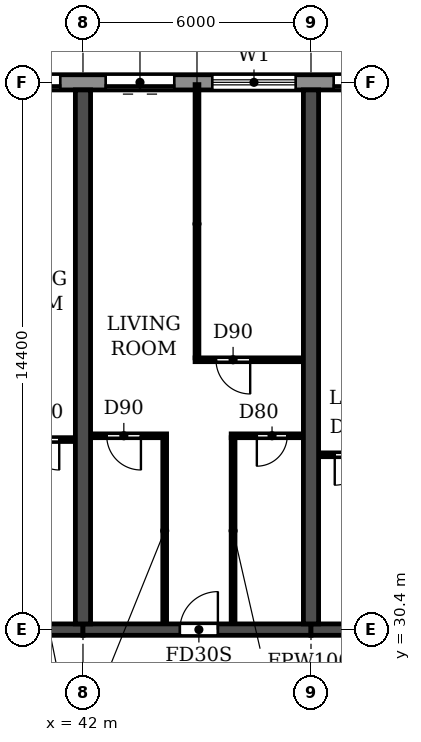
"""IFC4 building model, lengths in metres.
Left out: names, types, materials, properties, quantities, classifications, styles, units other than length and angle.
Written with IfcOpenShell. Run it as: python <this file> out.ifc"""

import sys

from ifc_helpers import new_model, si_unit, direction, frame, frame_2d, origin, place, context, subcontext, project, spatial, rectangle, extrude, element, fill, save


model = new_model("IFC4")
c1 = context("Model", 3, precision=1e-05, world=origin(), true_north=direction((0.0, 1.0)))
c2 = subcontext(c1, "Body", "Model", "MODEL_VIEW")
j1 = project(units=[si_unit("LENGTHUNIT", "METRE"), si_unit("PLANEANGLEUNIT", "RADIAN")], contexts=[c1])
p1 = place(None, origin())
s1 = spatial("IfcSite", under=j1, at=p1, CompositionType="ELEMENT")
p2 = place(p1, origin())
s2 = spatial("IfcBuilding", under=s1, at=p2, CompositionType="ELEMENT")
p3 = place(p2, frame((0.0, 0.0, 23.4)))
s3 = spatial("IfcBuildingStorey", under=s2, at=p3, CompositionType="ELEMENT", Elevation=23.4)
for number, where, z_axis, x_axis in (
    (1, (42.0, 30.55, 0.0), (0.0, 0.0, 1.0), (0.0, 1.0, 0.0)),
    (2, (48.0, 30.55, 0.0), (0.0, 0.0, 1.0), (0.0, 1.0, 0.0)),
):
    element("IfcWall", number, at=place(p3, frame(where, z_axis=z_axis, x_axis=x_axis)), inside=s3, PredefinedType="SHEAR", context=c2, shape_type="SweptSolid", body=[
        extrude(rectangle(XDim=14.05, YDim=0.4, at=frame_2d((7.025, 0.0))), origin(), (0.0, 0.0, 1.0), 3.05),
    ])
p4 = place(p3, frame((36.0, 30.4, 0.0), z_axis=(0.0, 0.0, 1.0), x_axis=(1.0, 0.0, 0.0)))
e3 = element("IfcWall", 3, at=p4, inside=s3, PredefinedType="SHEAR", context=c2, shape_type="SweptSolid", body=[
    extrude(rectangle(XDim=6.0, YDim=0.3, at=frame_2d((3.0, 0.0))), origin(), (0.0, 0.0, 1.0), 2.45),
])
p5 = place(p4, frame((2.55, 0.0, 0.0)))
e4 = element("IfcOpeningElement", 4, at=p5, cuts=e3, PredefinedType="OPENING", context=c2, shape_type="SweptSolid", body=[
    extrude(rectangle(XDim=1.0, YDim=2.1, at=frame_2d((0.5, 1.05))), frame((0.0, 0.16, 0.0), z_axis=(0.0, -1.0, 0.0), x_axis=(1.0, 0.0, 0.0)), (0.0, 0.0, 1.0), 0.32),
])
p6 = place(p3, frame((42.0, 30.4, 0.0), z_axis=(0.0, 0.0, 1.0), x_axis=(1.0, 0.0, 0.0)))
e5 = element("IfcWall", 5, at=p6, inside=s3, PredefinedType="SHEAR", context=c2, shape_type="SweptSolid", body=[
    extrude(rectangle(XDim=6.0, YDim=0.3, at=frame_2d((3.0, 0.0))), origin(), (0.0, 0.0, 1.0), 2.45),
])
p7 = place(p6, frame((2.55, 0.0, 0.0)))
e6 = element("IfcOpeningElement", 6, at=p7, cuts=e5, PredefinedType="OPENING", context=c2, shape_type="SweptSolid", body=[
    extrude(rectangle(XDim=1.0, YDim=2.1, at=frame_2d((0.5, 1.05))), frame((0.0, 0.16, 0.0), z_axis=(0.0, -1.0, 0.0), x_axis=(1.0, 0.0, 0.0)), (0.0, 0.0, 1.0), 0.32),
])
p8 = place(p3, frame((48.0, 30.4, 0.0), z_axis=(0.0, 0.0, 1.0), x_axis=(1.0, 0.0, 0.0)))
e7 = element("IfcWall", 7, at=p8, inside=s3, PredefinedType="SHEAR", context=c2, shape_type="SweptSolid", body=[
    extrude(rectangle(XDim=6.0, YDim=0.3, at=frame_2d((3.0, 0.0))), origin(), (0.0, 0.0, 1.0), 2.45),
])
p9 = place(p8, frame((2.45, 0.0, 0.0)))
e8 = element("IfcOpeningElement", 8, at=p9, cuts=e7, PredefinedType="OPENING", context=c2, shape_type="SweptSolid", body=[
    extrude(rectangle(XDim=1.0, YDim=2.1, at=frame_2d((0.5, 1.05))), frame((0.0, 0.16, 0.0), z_axis=(0.0, -1.0, 0.0), x_axis=(1.0, 0.0, 0.0)), (0.0, 0.0, 1.0), 0.32),
])
p10 = place(p3, frame((97.317, 44.8, 0.0), z_axis=(0.0, 0.0, 1.0), x_axis=(-1.0, 0.0, 0.0)))
e9 = element("IfcWall", 9, at=p10, inside=s3, PredefinedType="STANDARD", context=c2, shape_type="SweptSolid", body=[
    extrude(rectangle(XDim=92.634, YDim=0.4, at=frame_2d((46.317, 0.0))), origin(), (0.0, 0.0, 1.0), 3.05),
])
p11 = place(p10, frame((88.717, 0.0, 0.9)))
e10 = element("IfcOpeningElement", 10, at=p11, cuts=e9, PredefinedType="OPENING", context=c2, shape_type="SweptSolid", body=[
    extrude(rectangle(XDim=2.2, YDim=1.5, at=frame_2d((1.1, 0.75))), frame((0.0, 0.21, 0.0), z_axis=(0.0, -1.0, 0.0), x_axis=(1.0, 0.0, 0.0)), (0.0, 0.0, 1.0), 0.42),
])
p12 = place(p10, frame((85.917, 0.0, 0.0)))
e11 = element("IfcOpeningElement", 11, at=p12, cuts=e9, PredefinedType="OPENING", context=c2, shape_type="SweptSolid", body=[
    extrude(rectangle(XDim=1.8, YDim=2.4, at=frame_2d((0.9, 1.2))), frame((0.0, 0.21, 0.0), z_axis=(0.0, -1.0, 0.0), x_axis=(1.0, 0.0, 0.0)), (0.0, 0.0, 1.0), 0.42),
])
p13 = place(p10, frame((82.717, 0.0, 0.9)))
e12 = element("IfcOpeningElement", 12, at=p13, cuts=e9, PredefinedType="OPENING", context=c2, shape_type="SweptSolid", body=[
    extrude(rectangle(XDim=2.2, YDim=1.5, at=frame_2d((1.1, 0.75))), frame((0.0, 0.21, 0.0), z_axis=(0.0, -1.0, 0.0), x_axis=(1.0, 0.0, 0.0)), (0.0, 0.0, 1.0), 0.42),
])
p14 = place(p10, frame((79.717, 0.0, 0.9)))
e13 = element("IfcOpeningElement", 13, at=p14, cuts=e9, PredefinedType="OPENING", context=c2, shape_type="SweptSolid", body=[
    extrude(rectangle(XDim=2.2, YDim=1.5, at=frame_2d((1.1, 0.75))), frame((0.0, 0.21, 0.0), z_axis=(0.0, -1.0, 0.0), x_axis=(1.0, 0.0, 0.0)), (0.0, 0.0, 1.0), 0.42),
])
p15 = place(p10, frame((76.917, 0.0, 0.0)))
e14 = element("IfcOpeningElement", 14, at=p15, cuts=e9, PredefinedType="OPENING", context=c2, shape_type="SweptSolid", body=[
    extrude(rectangle(XDim=1.8, YDim=2.4, at=frame_2d((0.9, 1.2))), frame((0.0, 0.21, 0.0), z_axis=(0.0, -1.0, 0.0), x_axis=(1.0, 0.0, 0.0)), (0.0, 0.0, 1.0), 0.42),
])
p16 = place(p10, frame((73.717, 0.0, 0.9)))
e15 = element("IfcOpeningElement", 15, at=p16, cuts=e9, PredefinedType="OPENING", context=c2, shape_type="SweptSolid", body=[
    extrude(rectangle(XDim=2.2, YDim=1.5, at=frame_2d((1.1, 0.75))), frame((0.0, 0.21, 0.0), z_axis=(0.0, -1.0, 0.0), x_axis=(1.0, 0.0, 0.0)), (0.0, 0.0, 1.0), 0.42),
])
p17 = place(p10, frame((70.717, 0.0, 0.9)))
e16 = element("IfcOpeningElement", 16, at=p17, cuts=e9, PredefinedType="OPENING", context=c2, shape_type="SweptSolid", body=[
    extrude(rectangle(XDim=2.2, YDim=1.5, at=frame_2d((1.1, 0.75))), frame((0.0, 0.21, 0.0), z_axis=(0.0, -1.0, 0.0), x_axis=(1.0, 0.0, 0.0)), (0.0, 0.0, 1.0), 0.42),
])
p18 = place(p10, frame((67.717, 0.0, 0.9)))
e17 = element("IfcOpeningElement", 17, at=p18, cuts=e9, PredefinedType="OPENING", context=c2, shape_type="SweptSolid", body=[
    extrude(rectangle(XDim=2.2, YDim=1.5, at=frame_2d((1.1, 0.75))), frame((0.0, 0.21, 0.0), z_axis=(0.0, -1.0, 0.0), x_axis=(1.0, 0.0, 0.0)), (0.0, 0.0, 1.0), 0.42),
])
p19 = place(p10, frame((64.917, 0.0, 0.0)))
e18 = element("IfcOpeningElement", 18, at=p19, cuts=e9, PredefinedType="OPENING", context=c2, shape_type="SweptSolid", body=[
    extrude(rectangle(XDim=1.8, YDim=2.4, at=frame_2d((0.9, 1.2))), frame((0.0, 0.21, 0.0), z_axis=(0.0, -1.0, 0.0), x_axis=(1.0, 0.0, 0.0)), (0.0, 0.0, 1.0), 0.42),
])
p20 = place(p10, frame((61.717, 0.0, 0.9)))
e19 = element("IfcOpeningElement", 19, at=p20, cuts=e9, PredefinedType="OPENING", context=c2, shape_type="SweptSolid", body=[
    extrude(rectangle(XDim=2.2, YDim=1.5, at=frame_2d((1.1, 0.75))), frame((0.0, 0.21, 0.0), z_axis=(0.0, -1.0, 0.0), x_axis=(1.0, 0.0, 0.0)), (0.0, 0.0, 1.0), 0.42),
])
p21 = place(p10, frame((58.717, 0.0, 0.9)))
e20 = element("IfcOpeningElement", 20, at=p21, cuts=e9, PredefinedType="OPENING", context=c2, shape_type="SweptSolid", body=[
    extrude(rectangle(XDim=2.2, YDim=1.5, at=frame_2d((1.1, 0.75))), frame((0.0, 0.21, 0.0), z_axis=(0.0, -1.0, 0.0), x_axis=(1.0, 0.0, 0.0)), (0.0, 0.0, 1.0), 0.42),
])
p22 = place(p10, frame((55.917, 0.0, 0.0)))
e21 = element("IfcOpeningElement", 21, at=p22, cuts=e9, PredefinedType="OPENING", context=c2, shape_type="SweptSolid", body=[
    extrude(rectangle(XDim=1.8, YDim=2.4, at=frame_2d((0.9, 1.2))), frame((0.0, 0.21, 0.0), z_axis=(0.0, -1.0, 0.0), x_axis=(1.0, 0.0, 0.0)), (0.0, 0.0, 1.0), 0.42),
])
p23 = place(p10, frame((52.917, 0.0, 0.0)))
e22 = element("IfcOpeningElement", 22, at=p23, cuts=e9, PredefinedType="OPENING", context=c2, shape_type="SweptSolid", body=[
    extrude(rectangle(XDim=1.8, YDim=2.4, at=frame_2d((0.9, 1.2))), frame((0.0, 0.21, 0.0), z_axis=(0.0, -1.0, 0.0), x_axis=(1.0, 0.0, 0.0)), (0.0, 0.0, 1.0), 0.42),
])
p24 = place(p10, frame((49.717, 0.0, 0.9)))
e23 = element("IfcOpeningElement", 23, at=p24, cuts=e9, PredefinedType="OPENING", context=c2, shape_type="SweptSolid", body=[
    extrude(rectangle(XDim=2.2, YDim=1.5, at=frame_2d((1.1, 0.75))), frame((0.0, 0.21, 0.0), z_axis=(0.0, -1.0, 0.0), x_axis=(1.0, 0.0, 0.0)), (0.0, 0.0, 1.0), 0.42),
])
p25 = place(p10, frame((46.917, 0.0, 0.0)))
e24 = element("IfcOpeningElement", 24, at=p25, cuts=e9, PredefinedType="OPENING", context=c2, shape_type="SweptSolid", body=[
    extrude(rectangle(XDim=1.8, YDim=2.4, at=frame_2d((0.9, 1.2))), frame((0.0, 0.21, 0.0), z_axis=(0.0, -1.0, 0.0), x_axis=(1.0, 0.0, 0.0)), (0.0, 0.0, 1.0), 0.42),
])
p26 = place(p10, frame((43.717, 0.0, 0.9)))
e25 = element("IfcOpeningElement", 25, at=p26, cuts=e9, PredefinedType="OPENING", context=c2, shape_type="SweptSolid", body=[
    extrude(rectangle(XDim=2.2, YDim=1.5, at=frame_2d((1.1, 0.75))), frame((0.0, 0.21, 0.0), z_axis=(0.0, -1.0, 0.0), x_axis=(1.0, 0.0, 0.0)), (0.0, 0.0, 1.0), 0.42),
])
p27 = place(p10, frame((40.717, 0.0, 0.9)))
e26 = element("IfcOpeningElement", 26, at=p27, cuts=e9, PredefinedType="OPENING", context=c2, shape_type="SweptSolid", body=[
    extrude(rectangle(XDim=2.2, YDim=1.5, at=frame_2d((1.1, 0.75))), frame((0.0, 0.21, 0.0), z_axis=(0.0, -1.0, 0.0), x_axis=(1.0, 0.0, 0.0)), (0.0, 0.0, 1.0), 0.42),
])
p28 = place(p10, frame((37.917, 0.0, 0.0)))
e27 = element("IfcOpeningElement", 27, at=p28, cuts=e9, PredefinedType="OPENING", context=c2, shape_type="SweptSolid", body=[
    extrude(rectangle(XDim=1.8, YDim=2.4, at=frame_2d((0.9, 1.2))), frame((0.0, 0.21, 0.0), z_axis=(0.0, -1.0, 0.0), x_axis=(1.0, 0.0, 0.0)), (0.0, 0.0, 1.0), 0.42),
])
p29 = place(p10, frame((34.917, 0.0, 0.0)))
e28 = element("IfcOpeningElement", 28, at=p29, cuts=e9, PredefinedType="OPENING", context=c2, shape_type="SweptSolid", body=[
    extrude(rectangle(XDim=1.8, YDim=2.4, at=frame_2d((0.9, 1.2))), frame((0.0, 0.21, 0.0), z_axis=(0.0, -1.0, 0.0), x_axis=(1.0, 0.0, 0.0)), (0.0, 0.0, 1.0), 0.42),
])
p30 = place(p10, frame((31.717, 0.0, 0.9)))
e29 = element("IfcOpeningElement", 29, at=p30, cuts=e9, PredefinedType="OPENING", context=c2, shape_type="SweptSolid", body=[
    extrude(rectangle(XDim=2.2, YDim=1.5, at=frame_2d((1.1, 0.75))), frame((0.0, 0.21, 0.0), z_axis=(0.0, -1.0, 0.0), x_axis=(1.0, 0.0, 0.0)), (0.0, 0.0, 1.0), 0.42),
])
p31 = place(p10, frame((28.717, 0.0, 0.9)))
e30 = element("IfcOpeningElement", 30, at=p31, cuts=e9, PredefinedType="OPENING", context=c2, shape_type="SweptSolid", body=[
    extrude(rectangle(XDim=2.2, YDim=1.5, at=frame_2d((1.1, 0.75))), frame((0.0, 0.21, 0.0), z_axis=(0.0, -1.0, 0.0), x_axis=(1.0, 0.0, 0.0)), (0.0, 0.0, 1.0), 0.42),
])
p32 = place(p10, frame((25.717, 0.0, 0.9)))
e31 = element("IfcOpeningElement", 31, at=p32, cuts=e9, PredefinedType="OPENING", context=c2, shape_type="SweptSolid", body=[
    extrude(rectangle(XDim=2.2, YDim=1.5, at=frame_2d((1.1, 0.75))), frame((0.0, 0.21, 0.0), z_axis=(0.0, -1.0, 0.0), x_axis=(1.0, 0.0, 0.0)), (0.0, 0.0, 1.0), 0.42),
])
p33 = place(p10, frame((22.717, 0.0, 0.9)))
e32 = element("IfcOpeningElement", 32, at=p33, cuts=e9, PredefinedType="OPENING", context=c2, shape_type="SweptSolid", body=[
    extrude(rectangle(XDim=2.2, YDim=1.5, at=frame_2d((1.1, 0.75))), frame((0.0, 0.21, 0.0), z_axis=(0.0, -1.0, 0.0), x_axis=(1.0, 0.0, 0.0)), (0.0, 0.0, 1.0), 0.42),
])
p34 = place(p10, frame((19.917, 0.0, 0.0)))
e33 = element("IfcOpeningElement", 33, at=p34, cuts=e9, PredefinedType="OPENING", context=c2, shape_type="SweptSolid", body=[
    extrude(rectangle(XDim=1.8, YDim=2.4, at=frame_2d((0.9, 1.2))), frame((0.0, 0.21, 0.0), z_axis=(0.0, -1.0, 0.0), x_axis=(1.0, 0.0, 0.0)), (0.0, 0.0, 1.0), 0.42),
])
p35 = place(p10, frame((16.717, 0.0, 0.9)))
e34 = element("IfcOpeningElement", 34, at=p35, cuts=e9, PredefinedType="OPENING", context=c2, shape_type="SweptSolid", body=[
    extrude(rectangle(XDim=2.2, YDim=1.5, at=frame_2d((1.1, 0.75))), frame((0.0, 0.21, 0.0), z_axis=(0.0, -1.0, 0.0), x_axis=(1.0, 0.0, 0.0)), (0.0, 0.0, 1.0), 0.42),
])
p36 = place(p10, frame((13.717, 0.0, 0.9)))
e35 = element("IfcOpeningElement", 35, at=p36, cuts=e9, PredefinedType="OPENING", context=c2, shape_type="SweptSolid", body=[
    extrude(rectangle(XDim=2.2, YDim=1.5, at=frame_2d((1.1, 0.75))), frame((0.0, 0.21, 0.0), z_axis=(0.0, -1.0, 0.0), x_axis=(1.0, 0.0, 0.0)), (0.0, 0.0, 1.0), 0.42),
])
p37 = place(p10, frame((10.717, 0.0, 0.9)))
e36 = element("IfcOpeningElement", 36, at=p37, cuts=e9, PredefinedType="OPENING", context=c2, shape_type="SweptSolid", body=[
    extrude(rectangle(XDim=2.2, YDim=1.5, at=frame_2d((1.1, 0.75))), frame((0.0, 0.21, 0.0), z_axis=(0.0, -1.0, 0.0), x_axis=(1.0, 0.0, 0.0)), (0.0, 0.0, 1.0), 0.42),
])
p38 = place(p10, frame((7.917, 0.0, 0.0)))
e37 = element("IfcOpeningElement", 37, at=p38, cuts=e9, PredefinedType="OPENING", context=c2, shape_type="SweptSolid", body=[
    extrude(rectangle(XDim=1.8, YDim=2.4, at=frame_2d((0.9, 1.2))), frame((0.0, 0.21, 0.0), z_axis=(0.0, -1.0, 0.0), x_axis=(1.0, 0.0, 0.0)), (0.0, 0.0, 1.0), 0.42),
])
p39 = place(p10, frame((4.917, 0.0, 0.0)))
e38 = element("IfcOpeningElement", 38, at=p39, cuts=e9, PredefinedType="OPENING", context=c2, shape_type="SweptSolid", body=[
    extrude(rectangle(XDim=1.8, YDim=2.4, at=frame_2d((0.9, 1.2))), frame((0.0, 0.21, 0.0), z_axis=(0.0, -1.0, 0.0), x_axis=(1.0, 0.0, 0.0)), (0.0, 0.0, 1.0), 0.42),
])
p40 = place(p10, frame((1.717, 0.0, 0.9)))
e39 = element("IfcOpeningElement", 39, at=p40, cuts=e9, PredefinedType="OPENING", context=c2, shape_type="SweptSolid", body=[
    extrude(rectangle(XDim=2.2, YDim=1.5, at=frame_2d((1.1, 0.75))), frame((0.0, 0.21, 0.0), z_axis=(0.0, -1.0, 0.0), x_axis=(1.0, 0.0, 0.0)), (0.0, 0.0, 1.0), 0.42),
])
p41 = place(p3, frame((48.21, 35.0, 0.0), z_axis=(0.0, 0.0, 1.0), x_axis=(1.0, 0.0, 0.0)))
e40 = element("IfcWall", 40, at=p41, inside=s3, PredefinedType="PARTITIONING", context=c2, shape_type="SweptSolid", body=[
    extrude(rectangle(XDim=1.89, YDim=0.1, at=frame_2d((0.945, 0.0))), origin(), (0.0, 0.0, 1.0), 3.05),
])
p42 = place(p41, frame((0.415, 0.0, 0.0)))
e41 = element("IfcOpeningElement", 41, at=p42, cuts=e40, PredefinedType="OPENING", context=c2, shape_type="SweptSolid", body=[
    extrude(rectangle(XDim=0.8, YDim=2.1, at=frame_2d((0.4, 1.05))), frame((0.0, 0.06, 0.0), z_axis=(0.0, -1.0, 0.0), x_axis=(1.0, 0.0, 0.0)), (0.0, 0.0, 1.0), 0.12),
])
p43 = place(p3, frame((39.9, 35.4, 0.0), z_axis=(0.0, 0.0, 1.0), x_axis=(1.0, 0.0, 0.0)))
e42 = element("IfcWall", 42, at=p43, inside=s3, PredefinedType="PARTITIONING", context=c2, shape_type="SweptSolid", body=[
    extrude(rectangle(XDim=1.89, YDim=0.1, at=frame_2d((0.945, 0.0))), origin(), (0.0, 0.0, 1.0), 3.05),
])
p44 = place(p43, frame((0.675, 0.0, 0.0)))
e43 = element("IfcOpeningElement", 43, at=p44, cuts=e42, PredefinedType="OPENING", context=c2, shape_type="SweptSolid", body=[
    extrude(rectangle(XDim=0.8, YDim=2.1, at=frame_2d((0.4, 1.05))), frame((0.0, 0.06, 0.0), z_axis=(0.0, -1.0, 0.0), x_axis=(1.0, 0.0, 0.0)), (0.0, 0.0, 1.0), 0.12),
])
p45 = place(p3, frame((42.21, 35.5, 0.0), z_axis=(0.0, 0.0, 1.0), x_axis=(1.0, 0.0, 0.0)))
e44 = element("IfcWall", 44, at=p45, inside=s3, PredefinedType="PARTITIONING", context=c2, shape_type="SweptSolid", body=[
    extrude(rectangle(XDim=1.99, YDim=0.1, at=frame_2d((0.995, 0.0))), origin(), (0.0, 0.0, 1.0), 3.05),
])
p46 = place(p45, frame((0.415, 0.0, 0.0)))
e45 = element("IfcOpeningElement", 45, at=p46, cuts=e44, PredefinedType="OPENING", context=c2, shape_type="SweptSolid", body=[
    extrude(rectangle(XDim=0.9, YDim=2.1, at=frame_2d((0.45, 1.05))), frame((0.0, 0.06, 0.0), z_axis=(0.0, -1.0, 0.0), x_axis=(1.0, 0.0, 0.0)), (0.0, 0.0, 1.0), 0.12),
])
p47 = place(p3, frame((45.9, 35.5, 0.0), z_axis=(0.0, 0.0, 1.0), x_axis=(1.0, 0.0, 0.0)))
e46 = element("IfcWall", 46, at=p47, inside=s3, PredefinedType="PARTITIONING", context=c2, shape_type="SweptSolid", body=[
    extrude(rectangle(XDim=1.89, YDim=0.1, at=frame_2d((0.945, 0.0))), origin(), (0.0, 0.0, 1.0), 3.05),
])
p48 = place(p47, frame((0.675, 0.0, 0.0)))
e47 = element("IfcOpeningElement", 47, at=p48, cuts=e46, PredefinedType="OPENING", context=c2, shape_type="SweptSolid", body=[
    extrude(rectangle(XDim=0.8, YDim=2.1, at=frame_2d((0.4, 1.05))), frame((0.0, 0.06, 0.0), z_axis=(0.0, -1.0, 0.0), x_axis=(1.0, 0.0, 0.0)), (0.0, 0.0, 1.0), 0.12),
])
p49 = place(p3, frame((44.95, 37.5, 0.0), z_axis=(0.0, 0.0, 1.0), x_axis=(1.0, 0.0, 0.0)))
e48 = element("IfcWall", 48, at=p49, inside=s3, PredefinedType="PARTITIONING", context=c2, shape_type="SweptSolid", body=[
    extrude(rectangle(XDim=2.84, YDim=0.1, at=frame_2d((1.42, 0.0))), origin(), (0.0, 0.0, 1.0), 3.05),
])
p50 = place(p49, frame((0.55, 0.0, 0.0)))
e49 = element("IfcOpeningElement", 49, at=p50, cuts=e48, PredefinedType="OPENING", context=c2, shape_type="SweptSolid", body=[
    extrude(rectangle(XDim=0.9, YDim=2.1, at=frame_2d((0.45, 1.05))), frame((0.0, 0.06, 0.0), z_axis=(0.0, -1.0, 0.0), x_axis=(1.0, 0.0, 0.0)), (0.0, 0.0, 1.0), 0.12),
])
p51 = place(p3, frame((44.15, 30.56, 0.0), z_axis=(0.0, 0.0, 1.0), x_axis=(0.0, 1.0, 0.0)))
e50 = element("IfcWall", 50, at=p51, inside=s3, PredefinedType="PARTITIONING", context=c2, shape_type="SweptSolid", body=[
    extrude(rectangle(XDim=4.89, YDim=0.1, at=frame_2d((2.445, 0.0))), origin(), (0.0, 0.0, 1.0), 3.05),
])
p52 = place(p3, frame((45.0, 37.55, 0.0), z_axis=(0.0, 0.0, 1.0), x_axis=(0.0, 1.0, 0.0)))
e51 = element("IfcWall", 51, at=p52, inside=s3, PredefinedType="PARTITIONING", context=c2, shape_type="SweptSolid", body=[
    extrude(rectangle(XDim=7.19, YDim=0.1, at=frame_2d((3.595, 0.0))), origin(), (0.0, 0.0, 1.0), 3.05),
])
p53 = place(p3, frame((45.95, 30.56, 0.0), z_axis=(0.0, 0.0, 1.0), x_axis=(0.0, 1.0, 0.0)))
e52 = element("IfcWall", 52, at=p53, inside=s3, PredefinedType="PARTITIONING", context=c2, shape_type="SweptSolid", body=[
    extrude(rectangle(XDim=4.89, YDim=0.1, at=frame_2d((2.445, 0.0))), origin(), (0.0, 0.0, 1.0), 3.05),
])
p54 = place(p22, origin())
e53 = element("IfcDoor", 53, at=p54, inside=s3, OperationType="DOUBLE_DOOR_SLIDING", PredefinedType="DOOR", context=c2, shape_type="SweptSolid", body=[
    extrude(rectangle(XDim=1.8, YDim=2.4, at=frame_2d((0.9, 1.2))), frame((0.0, 0.025, 0.0), z_axis=(0.0, -1.0, 0.0), x_axis=(1.0, 0.0, 0.0)), (0.0, 0.0, 1.0), 0.05),
])
fill(e21, e53)
p55 = place(p23, origin())
e54 = element("IfcDoor", 54, at=p55, inside=s3, OperationType="DOUBLE_DOOR_SLIDING", PredefinedType="DOOR", context=c2, shape_type="SweptSolid", body=[
    extrude(rectangle(XDim=1.8, YDim=2.4, at=frame_2d((0.9, 1.2))), frame((0.0, 0.025, 0.0), z_axis=(0.0, -1.0, 0.0), x_axis=(1.0, 0.0, 0.0)), (0.0, 0.0, 1.0), 0.05),
])
fill(e22, e54)
p56 = place(p24, origin())
e55 = element("IfcWindow", 55, at=p56, inside=s3, PartitioningType="DOUBLE_PANEL_HORIZONTAL", PredefinedType="WINDOW", context=c2, shape_type="SweptSolid", body=[
    extrude(rectangle(XDim=2.2, YDim=1.5, at=frame_2d((1.1, 0.75))), frame((0.0, 0.03, 0.0), z_axis=(0.0, -1.0, 0.0), x_axis=(1.0, 0.0, 0.0)), (0.0, 0.0, 1.0), 0.06),
])
fill(e23, e55)
p57 = place(p25, origin())
e56 = element("IfcDoor", 56, at=p57, inside=s3, OperationType="DOUBLE_DOOR_SLIDING", PredefinedType="DOOR", context=c2, shape_type="SweptSolid", body=[
    extrude(rectangle(XDim=1.8, YDim=2.4, at=frame_2d((0.9, 1.2))), frame((0.0, 0.025, 0.0), z_axis=(0.0, -1.0, 0.0), x_axis=(1.0, 0.0, 0.0)), (0.0, 0.0, 1.0), 0.05),
])
fill(e24, e56)
p58 = place(p44, frame((0.8, 0.0, 0.0), z_axis=(0.0, 0.0, 1.0), x_axis=(-1.0, 0.0, 0.0)))
e57 = element("IfcDoor", 57, at=p58, inside=s3, OperationType="SINGLE_SWING_LEFT", PredefinedType="DOOR", context=c2, shape_type="SweptSolid", body=[
    extrude(rectangle(XDim=0.8, YDim=2.1, at=frame_2d((0.4, 1.05))), frame((0.0, 0.025, 0.0), z_axis=(0.0, -1.0, 0.0), x_axis=(1.0, 0.0, 0.0)), (0.0, 0.0, 1.0), 0.05),
])
fill(e43, e57)
p59 = place(p46, frame((0.9, 0.0, 0.0), z_axis=(0.0, 0.0, 1.0), x_axis=(-1.0, 0.0, 0.0)))
e58 = element("IfcDoor", 58, at=p59, inside=s3, OperationType="SINGLE_SWING_LEFT", PredefinedType="DOOR", context=c2, shape_type="SweptSolid", body=[
    extrude(rectangle(XDim=0.9, YDim=2.1, at=frame_2d((0.45, 1.05))), frame((0.0, 0.025, 0.0), z_axis=(0.0, -1.0, 0.0), x_axis=(1.0, 0.0, 0.0)), (0.0, 0.0, 1.0), 0.05),
])
fill(e45, e58)
p60 = place(p7, origin())
e59 = element("IfcDoor", 59, at=p60, inside=s3, OperationType="SINGLE_SWING_RIGHT", PredefinedType="DOOR", context=c2, shape_type="SweptSolid", body=[
    extrude(rectangle(XDim=1.0, YDim=2.1, at=frame_2d((0.5, 1.05))), frame((0.0, 0.025, 0.0), z_axis=(0.0, -1.0, 0.0), x_axis=(1.0, 0.0, 0.0)), (0.0, 0.0, 1.0), 0.05),
])
fill(e6, e59)
p61 = place(p50, frame((0.9, 0.0, 0.0), z_axis=(0.0, 0.0, 1.0), x_axis=(-1.0, 0.0, 0.0)))
e60 = element("IfcDoor", 60, at=p61, inside=s3, OperationType="SINGLE_SWING_LEFT", PredefinedType="DOOR", context=c2, shape_type="SweptSolid", body=[
    extrude(rectangle(XDim=0.9, YDim=2.1, at=frame_2d((0.45, 1.05))), frame((0.0, 0.025, 0.0), z_axis=(0.0, -1.0, 0.0), x_axis=(1.0, 0.0, 0.0)), (0.0, 0.0, 1.0), 0.05),
])
fill(e49, e60)
p62 = place(p48, frame((0.8, 0.0, 0.0), z_axis=(0.0, 0.0, 1.0), x_axis=(-1.0, 0.0, 0.0)))
e61 = element("IfcDoor", 61, at=p62, inside=s3, OperationType="SINGLE_SWING_RIGHT", PredefinedType="DOOR", context=c2, shape_type="SweptSolid", body=[
    extrude(rectangle(XDim=0.8, YDim=2.1, at=frame_2d((0.4, 1.05))), frame((0.0, 0.025, 0.0), z_axis=(0.0, -1.0, 0.0), x_axis=(1.0, 0.0, 0.0)), (0.0, 0.0, 1.0), 0.05),
])
fill(e47, e61)
p63 = place(p42, frame((0.8, 0.0, 0.0), z_axis=(0.0, 0.0, 1.0), x_axis=(-1.0, 0.0, 0.0)))
e62 = element("IfcDoor", 62, at=p63, inside=s3, OperationType="SINGLE_SWING_RIGHT", PredefinedType="DOOR", context=c2, shape_type="SweptSolid", body=[
    extrude(rectangle(XDim=0.8, YDim=2.1, at=frame_2d((0.4, 1.05))), frame((0.0, 0.025, 0.0), z_axis=(0.0, -1.0, 0.0), x_axis=(1.0, 0.0, 0.0)), (0.0, 0.0, 1.0), 0.05),
])
fill(e41, e62)
save(model, sys.argv[1])
